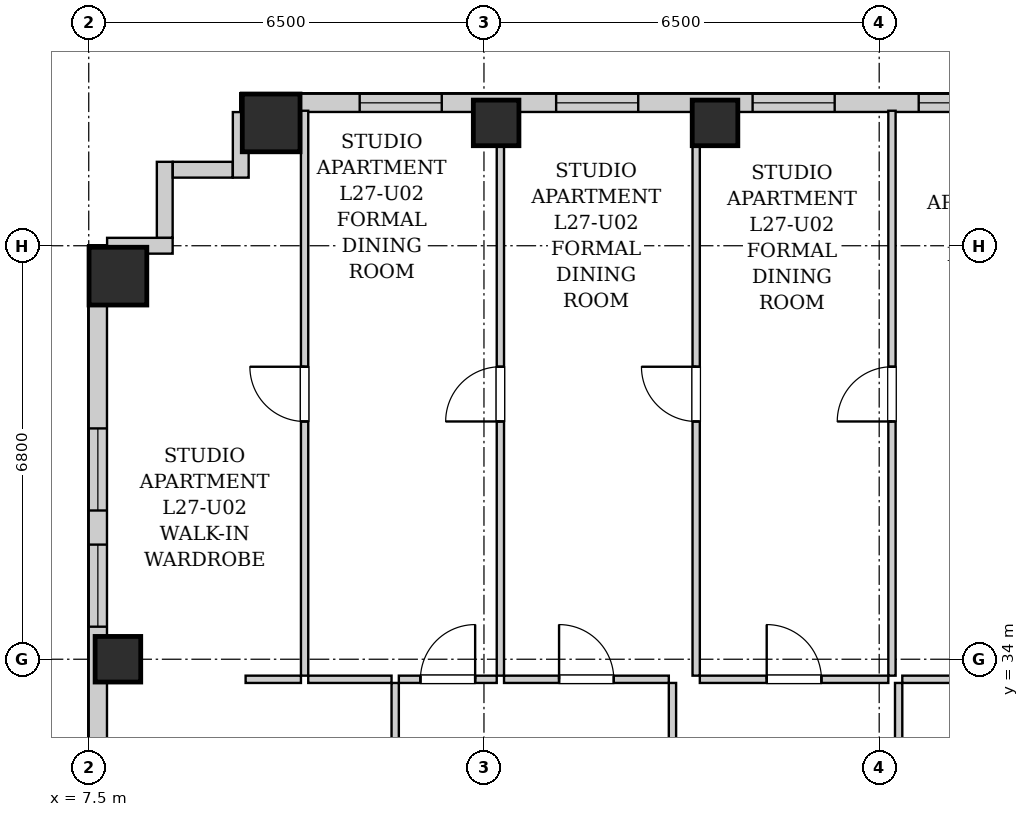
"""IFC4 building model, lengths in metres.
Left out: names, types, materials, properties, quantities, classifications, styles, units other than length and angle.
Written with IfcOpenShell. Run it as: python <this file> out.ifc"""

import sys

from ifc_helpers import new_model, si_unit, direction, frame, frame_2d, origin, origin_2d, place, context, subcontext, project, spatial, rectangle, extrude, element, fill, save


model = new_model("IFC4")
c1 = context("Model", 3, precision=1e-05, world=origin(), true_north=direction((0.0, 1.0)))
c2 = subcontext(c1, "Body", "Model", "MODEL_VIEW")
j1 = project(units=[si_unit("LENGTHUNIT", "METRE"), si_unit("PLANEANGLEUNIT", "RADIAN")], contexts=[c1])
p1 = place(None, origin())
s1 = spatial("IfcSite", under=j1, at=p1, CompositionType="ELEMENT")
p2 = place(p1, origin())
s2 = spatial("IfcBuilding", under=s1, at=p2, CompositionType="ELEMENT")
p3 = place(p2, frame((0.0, 0.0, 97.5)))
s3 = spatial("IfcBuildingStorey", under=s2, at=p3, CompositionType="ELEMENT", Elevation=97.5)
p4 = place(p3, frame((10.5, 42.82, 0.0), z_axis=(0.0, 0.0, 1.0), x_axis=(1.0, 0.0, 0.0)))
e1 = element("IfcColumn", 1, at=p4, inside=s3, PredefinedType="COLUMN", context=c2, shape_type="SweptSolid", body=[
    extrude(rectangle(XDim=0.95, YDim=0.95, at=origin_2d()), origin(), (0.0, 0.0, 1.0), 3.2),
])
for number, where, z_axis, x_axis in (
    (2, (14.2, 42.82, 0.0), (0.0, 0.0, 1.0), (1.0, 0.0, 0.0)),
    (3, (17.8, 42.82, 0.0), (0.0, 0.0, 1.0), (1.0, 0.0, 0.0)),
    (4, (7.98, 34.0, 0.0), (0.0, 0.0, 1.0), (1.0, 0.0, 0.0)),
):
    element("IfcColumn", number, at=place(p3, frame(where, z_axis=z_axis, x_axis=x_axis)), inside=s3, PredefinedType="COLUMN", context=c2, shape_type="SweptSolid", body=[
        extrude(rectangle(XDim=0.75, YDim=0.75, at=origin_2d()), origin(), (0.0, 0.0, 1.0), 3.2),
    ])
p5 = place(p3, frame((7.98, 40.3, 0.0), z_axis=(0.0, 0.0, 1.0), x_axis=(1.0, 0.0, 0.0)))
e5 = element("IfcColumn", 5, at=p5, inside=s3, PredefinedType="COLUMN", context=c2, shape_type="SweptSolid", body=[
    extrude(rectangle(XDim=0.95, YDim=0.95, at=origin_2d()), origin(), (0.0, 0.0, 1.0), 3.2),
])
p6 = place(p3, frame((10.0, 43.15, 0.0), z_axis=(0.0, 0.0, 1.0), x_axis=(1.0, 0.0, 0.0)))
e6 = element("IfcWall", 6, at=p6, inside=s3, PredefinedType="SOLIDWALL", context=c2, shape_type="SweptSolid", body=[
    extrude(rectangle(XDim=24.35, YDim=0.3, at=frame_2d((12.175, 0.0))), origin(), (0.0, 0.0, 1.0), 2.94),
])
p7 = place(p6, frame((1.956, 0.0, 0.55)))
e7 = element("IfcOpeningElement", 7, at=p7, cuts=e6, PredefinedType="OPENING", context=c2, shape_type="SweptSolid", body=[
    extrude(rectangle(XDim=1.35, YDim=1.2, at=frame_2d((0.675, 0.6))), frame((0.0, 0.16, 0.0), z_axis=(0.0, -1.0, 0.0), x_axis=(1.0, 0.0, 0.0)), (0.0, 0.0, 1.0), 0.32),
])
p8 = place(p6, frame((5.187, 0.0, 0.55)))
e8 = element("IfcOpeningElement", 8, at=p8, cuts=e6, PredefinedType="OPENING", context=c2, shape_type="SweptSolid", body=[
    extrude(rectangle(XDim=1.35, YDim=1.2, at=frame_2d((0.675, 0.6))), frame((0.0, 0.16, 0.0), z_axis=(0.0, -1.0, 0.0), x_axis=(1.0, 0.0, 0.0)), (0.0, 0.0, 1.0), 0.32),
])
p9 = place(p6, frame((8.418, 0.0, 0.55)))
e9 = element("IfcOpeningElement", 9, at=p9, cuts=e6, PredefinedType="OPENING", context=c2, shape_type="SweptSolid", body=[
    extrude(rectangle(XDim=1.35, YDim=1.2, at=frame_2d((0.675, 0.6))), frame((0.0, 0.16, 0.0), z_axis=(0.0, -1.0, 0.0), x_axis=(1.0, 0.0, 0.0)), (0.0, 0.0, 1.0), 0.32),
])
p10 = place(p6, frame((11.15, 0.0, 0.55)))
e10 = element("IfcOpeningElement", 10, at=p10, cuts=e6, PredefinedType="OPENING", context=c2, shape_type="SweptSolid", body=[
    extrude(rectangle(XDim=1.35, YDim=1.2, at=frame_2d((0.675, 0.6))), frame((0.0, 0.16, 0.0), z_axis=(0.0, -1.0, 0.0), x_axis=(1.0, 0.0, 0.0)), (0.0, 0.0, 1.0), 0.32),
])
p11 = place(p6, frame((18.038, 0.0, 0.55)))
e11 = element("IfcOpeningElement", 11, at=p11, cuts=e6, PredefinedType="OPENING", context=c2, shape_type="SweptSolid", body=[
    extrude(rectangle(XDim=1.35, YDim=1.2, at=frame_2d((0.675, 0.6))), frame((0.0, 0.16, 0.0), z_axis=(0.0, -1.0, 0.0), x_axis=(1.0, 0.0, 0.0)), (0.0, 0.0, 1.0), 0.32),
])
p12 = place(p6, frame((21.315, 0.0, 0.55)))
e12 = element("IfcOpeningElement", 12, at=p12, cuts=e6, PredefinedType="OPENING", context=c2, shape_type="SweptSolid", body=[
    extrude(rectangle(XDim=1.35, YDim=1.2, at=frame_2d((0.675, 0.6))), frame((0.0, 0.16, 0.0), z_axis=(0.0, -1.0, 0.0), x_axis=(1.0, 0.0, 0.0)), (0.0, 0.0, 1.0), 0.32),
])
p13 = place(p3, frame((7.65, 2.5, 0.0), z_axis=(0.0, 0.0, 1.0), x_axis=(0.0, 1.0, 0.0)))
e13 = element("IfcWall", 13, at=p13, inside=s3, PredefinedType="SOLIDWALL", context=c2, shape_type="SweptSolid", body=[
    extrude(rectangle(XDim=38.3, YDim=0.3, at=frame_2d((19.15, 0.0))), origin(), (0.0, 0.0, 1.0), 2.94),
])
p14 = place(p13, frame((3.38, 0.0, 0.55)))
e14 = element("IfcOpeningElement", 14, at=p14, cuts=e13, PredefinedType="OPENING", context=c2, shape_type="SweptSolid", body=[
    extrude(rectangle(XDim=1.35, YDim=1.2, at=frame_2d((0.675, 0.6))), frame((0.0, 0.16, 0.0), z_axis=(0.0, -1.0, 0.0), x_axis=(1.0, 0.0, 0.0)), (0.0, 0.0, 1.0), 0.32),
])
p15 = place(p13, frame((1.135, 0.0, 0.55)))
e15 = element("IfcOpeningElement", 15, at=p15, cuts=e13, PredefinedType="OPENING", context=c2, shape_type="SweptSolid", body=[
    extrude(rectangle(XDim=1.35, YDim=1.2, at=frame_2d((0.675, 0.6))), frame((0.0, 0.16, 0.0), z_axis=(0.0, -1.0, 0.0), x_axis=(1.0, 0.0, 0.0)), (0.0, 0.0, 1.0), 0.32),
])
p16 = place(p13, frame((33.946, 0.0, 0.55)))
e16 = element("IfcOpeningElement", 16, at=p16, cuts=e13, PredefinedType="OPENING", context=c2, shape_type="SweptSolid", body=[
    extrude(rectangle(XDim=1.35, YDim=1.2, at=frame_2d((0.675, 0.6))), frame((0.0, 0.16, 0.0), z_axis=(0.0, -1.0, 0.0), x_axis=(1.0, 0.0, 0.0)), (0.0, 0.0, 1.0), 0.32),
])
p17 = place(p13, frame((32.035, 0.0, 0.55)))
e17 = element("IfcOpeningElement", 17, at=p17, cuts=e13, PredefinedType="OPENING", context=c2, shape_type="SweptSolid", body=[
    extrude(rectangle(XDim=1.35, YDim=1.2, at=frame_2d((0.675, 0.6))), frame((0.0, 0.16, 0.0), z_axis=(0.0, -1.0, 0.0), x_axis=(1.0, 0.0, 0.0)), (0.0, 0.0, 1.0), 0.32),
])
p18 = place(p13, frame((15.65, 0.0, 0.55)))
e18 = element("IfcOpeningElement", 18, at=p18, cuts=e13, PredefinedType="OPENING", context=c2, shape_type="SweptSolid", body=[
    extrude(rectangle(XDim=1.35, YDim=1.2, at=frame_2d((0.675, 0.6))), frame((0.0, 0.16, 0.0), z_axis=(0.0, -1.0, 0.0), x_axis=(1.0, 0.0, 0.0)), (0.0, 0.0, 1.0), 0.32),
])
p19 = place(p13, frame((13.035, 0.0, 0.55)))
e19 = element("IfcOpeningElement", 19, at=p19, cuts=e13, PredefinedType="OPENING", context=c2, shape_type="SweptSolid", body=[
    extrude(rectangle(XDim=1.35, YDim=1.2, at=frame_2d((0.675, 0.6))), frame((0.0, 0.16, 0.0), z_axis=(0.0, -1.0, 0.0), x_axis=(1.0, 0.0, 0.0)), (0.0, 0.0, 1.0), 0.32),
])
p20 = place(p13, frame((22.831, 0.0, 0.55)))
e20 = element("IfcOpeningElement", 20, at=p20, cuts=e13, PredefinedType="OPENING", context=c2, shape_type="SweptSolid", body=[
    extrude(rectangle(XDim=1.35, YDim=1.2, at=frame_2d((0.675, 0.6))), frame((0.0, 0.16, 0.0), z_axis=(0.0, -1.0, 0.0), x_axis=(1.0, 0.0, 0.0)), (0.0, 0.0, 1.0), 0.32),
])
p21 = place(p13, frame((24.441, 0.0, 0.55)))
e21 = element("IfcOpeningElement", 21, at=p21, cuts=e13, PredefinedType="OPENING", context=c2, shape_type="SweptSolid", body=[
    extrude(rectangle(XDim=1.35, YDim=1.2, at=frame_2d((0.675, 0.6))), frame((0.0, 0.16, 0.0), z_axis=(0.0, -1.0, 0.0), x_axis=(1.0, 0.0, 0.0)), (0.0, 0.0, 1.0), 0.32),
])
p22 = place(p3, frame((7.802, 40.8, 0.0), z_axis=(0.0, 0.0, 1.0), x_axis=(1.0, 0.0, 0.0)))
e22 = element("IfcWall", 22, at=p22, inside=s3, PredefinedType="SOLIDWALL", context=c2, shape_type="SweptSolid", body=[
    extrude(rectangle(XDim=1.078, YDim=0.26, at=frame_2d((0.539, 0.0))), origin(), (0.0, 0.0, 1.0), 2.94),
])
p23 = place(p3, frame((8.75, 40.932, 0.0), z_axis=(0.0, 0.0, 1.0), x_axis=(0.0, 1.0, 0.0)))
e23 = element("IfcWall", 23, at=p23, inside=s3, PredefinedType="SOLIDWALL", context=c2, shape_type="SweptSolid", body=[
    extrude(rectangle(XDim=1.248, YDim=0.26, at=frame_2d((0.624, 0.0))), origin(), (0.0, 0.0, 1.0), 2.94),
])
p24 = place(p3, frame((8.882, 42.05, 0.0), z_axis=(0.0, 0.0, 1.0), x_axis=(1.0, 0.0, 0.0)))
e24 = element("IfcWall", 24, at=p24, inside=s3, PredefinedType="SOLIDWALL", context=c2, shape_type="SweptSolid", body=[
    extrude(rectangle(XDim=0.986, YDim=0.26, at=frame_2d((0.493, 0.0))), origin(), (0.0, 0.0, 1.0), 2.94),
])
p25 = place(p3, frame((10.0, 41.92, 0.0), z_axis=(0.0, 0.0, 1.0), x_axis=(0.0, 1.0, 0.0)))
e25 = element("IfcWall", 25, at=p25, inside=s3, PredefinedType="SOLIDWALL", context=c2, shape_type="SweptSolid", body=[
    extrude(rectangle(XDim=1.078, YDim=0.26, at=frame_2d((0.539, 0.0))), origin(), (0.0, 0.0, 1.0), 2.94),
])
p26 = place(p3, frame((12.54, 30.76, 0.0), z_axis=(0.0, 0.0, 1.0), x_axis=(0.0, 1.0, 0.0)))
e26 = element("IfcWall", 26, at=p26, inside=s3, PredefinedType="PARTITIONING", context=c2, shape_type="SweptSolid", body=[
    extrude(rectangle(XDim=2.85, YDim=0.12, at=frame_2d((1.425, 0.0))), origin(), (0.0, 0.0, 1.0), 2.94),
])
p27 = place(p26, frame((0.995, 0.0, 0.0)))
e27 = element("IfcOpeningElement", 27, at=p27, cuts=e26, PredefinedType="OPENING", context=c2, shape_type="SweptSolid", body=[
    extrude(rectangle(XDim=0.86, YDim=2.05, at=frame_2d((0.43, 1.025))), frame((0.0, 0.07, 0.0), z_axis=(0.0, -1.0, 0.0), x_axis=(1.0, 0.0, 0.0)), (0.0, 0.0, 1.0), 0.14),
])
p28 = place(p3, frame((10.08, 33.67, 0.0), z_axis=(0.0, 0.0, 1.0), x_axis=(1.0, 0.0, 0.0)))
e28 = element("IfcWall", 28, at=p28, inside=s3, PredefinedType="PARTITIONING", context=c2, shape_type="SweptSolid", body=[
    extrude(rectangle(XDim=0.91, YDim=0.12, at=frame_2d((0.455, 0.0))), origin(), (0.0, 0.0, 1.0), 2.94),
])
p29 = place(p3, frame((11.11, 33.67, 0.0), z_axis=(0.0, 0.0, 1.0), x_axis=(1.0, 0.0, 0.0)))
e29 = element("IfcWall", 29, at=p29, inside=s3, PredefinedType="PARTITIONING", context=c2, shape_type="SweptSolid", body=[
    extrude(rectangle(XDim=1.37, YDim=0.12, at=frame_2d((0.685, 0.0))), origin(), (0.0, 0.0, 1.0), 2.94),
])
p30 = place(p3, frame((17.1, 30.76, 0.0), z_axis=(0.0, 0.0, 1.0), x_axis=(0.0, 1.0, 0.0)))
e30 = element("IfcWall", 30, at=p30, inside=s3, PredefinedType="PARTITIONING", context=c2, shape_type="SweptSolid", body=[
    extrude(rectangle(XDim=2.85, YDim=0.12, at=frame_2d((1.425, 0.0))), origin(), (0.0, 0.0, 1.0), 2.94),
])
p31 = place(p30, frame((0.975, 0.0, 0.0)))
e31 = element("IfcOpeningElement", 31, at=p31, cuts=e30, PredefinedType="OPENING", context=c2, shape_type="SweptSolid", body=[
    extrude(rectangle(XDim=0.9, YDim=2.05, at=frame_2d((0.45, 1.025))), frame((0.0, 0.07, 0.0), z_axis=(0.0, -1.0, 0.0), x_axis=(1.0, 0.0, 0.0)), (0.0, 0.0, 1.0), 0.14),
])
p32 = place(p3, frame((12.6, 33.67, 0.0), z_axis=(0.0, 0.0, 1.0), x_axis=(1.0, 0.0, 0.0)))
e32 = element("IfcWall", 32, at=p32, inside=s3, PredefinedType="PARTITIONING", context=c2, shape_type="SweptSolid", body=[
    extrude(rectangle(XDim=1.61, YDim=0.12, at=frame_2d((0.805, 0.0))), origin(), (0.0, 0.0, 1.0), 2.94),
])
p33 = place(p32, frame((0.355, 0.0, 0.0)))
e33 = element("IfcOpeningElement", 33, at=p33, cuts=e32, PredefinedType="OPENING", context=c2, shape_type="SweptSolid", body=[
    extrude(rectangle(XDim=0.9, YDim=2.05, at=frame_2d((0.45, 1.025))), frame((0.0, 0.07, 0.0), z_axis=(0.0, -1.0, 0.0), x_axis=(1.0, 0.0, 0.0)), (0.0, 0.0, 1.0), 0.14),
])
p34 = place(p3, frame((14.33, 33.67, 0.0), z_axis=(0.0, 0.0, 1.0), x_axis=(1.0, 0.0, 0.0)))
e34 = element("IfcWall", 34, at=p34, inside=s3, PredefinedType="PARTITIONING", context=c2, shape_type="SweptSolid", body=[
    extrude(rectangle(XDim=2.71, YDim=0.12, at=frame_2d((1.355, 0.0))), origin(), (0.0, 0.0, 1.0), 2.94),
])
p35 = place(p34, frame((0.905, 0.0, 0.0)))
e35 = element("IfcOpeningElement", 35, at=p35, cuts=e34, PredefinedType="OPENING", context=c2, shape_type="SweptSolid", body=[
    extrude(rectangle(XDim=0.9, YDim=2.05, at=frame_2d((0.45, 1.025))), frame((0.0, 0.07, 0.0), z_axis=(0.0, -1.0, 0.0), x_axis=(1.0, 0.0, 0.0)), (0.0, 0.0, 1.0), 0.14),
])
p36 = place(p3, frame((20.82, 30.76, 0.0), z_axis=(0.0, 0.0, 1.0), x_axis=(0.0, 1.0, 0.0)))
e36 = element("IfcWall", 36, at=p36, inside=s3, PredefinedType="PARTITIONING", context=c2, shape_type="SweptSolid", body=[
    extrude(rectangle(XDim=2.85, YDim=0.12, at=frame_2d((1.425, 0.0))), origin(), (0.0, 0.0, 1.0), 2.94),
])
p37 = place(p36, frame((0.975, 0.0, 0.0)))
e37 = element("IfcOpeningElement", 37, at=p37, cuts=e36, PredefinedType="OPENING", context=c2, shape_type="SweptSolid", body=[
    extrude(rectangle(XDim=0.9, YDim=2.05, at=frame_2d((0.45, 1.025))), frame((0.0, 0.07, 0.0), z_axis=(0.0, -1.0, 0.0), x_axis=(1.0, 0.0, 0.0)), (0.0, 0.0, 1.0), 0.14),
])
p38 = place(p3, frame((17.55, 33.67, 0.0), z_axis=(0.0, 0.0, 1.0), x_axis=(1.0, 0.0, 0.0)))
e38 = element("IfcWall", 38, at=p38, inside=s3, PredefinedType="PARTITIONING", context=c2, shape_type="SweptSolid", body=[
    extrude(rectangle(XDim=3.1, YDim=0.12, at=frame_2d((1.55, 0.0))), origin(), (0.0, 0.0, 1.0), 2.94),
])
p39 = place(p38, frame((1.1, 0.0, 0.0)))
e39 = element("IfcOpeningElement", 39, at=p39, cuts=e38, PredefinedType="OPENING", context=c2, shape_type="SweptSolid", body=[
    extrude(rectangle(XDim=0.9, YDim=2.05, at=frame_2d((0.45, 1.025))), frame((0.0, 0.07, 0.0), z_axis=(0.0, -1.0, 0.0), x_axis=(1.0, 0.0, 0.0)), (0.0, 0.0, 1.0), 0.14),
])
p40 = place(p3, frame((20.88, 33.67, 0.0), z_axis=(0.0, 0.0, 1.0), x_axis=(1.0, 0.0, 0.0)))
e40 = element("IfcWall", 40, at=p40, inside=s3, PredefinedType="PARTITIONING", context=c2, shape_type="SweptSolid", body=[
    extrude(rectangle(XDim=2.99, YDim=0.12, at=frame_2d((1.495, 0.0))), origin(), (0.0, 0.0, 1.0), 2.94),
])
p41 = place(p40, frame((1.045, 0.0, 0.0)))
e41 = element("IfcOpeningElement", 41, at=p41, cuts=e40, PredefinedType="OPENING", context=c2, shape_type="SweptSolid", body=[
    extrude(rectangle(XDim=0.9, YDim=2.05, at=frame_2d((0.45, 1.025))), frame((0.0, 0.07, 0.0), z_axis=(0.0, -1.0, 0.0), x_axis=(1.0, 0.0, 0.0)), (0.0, 0.0, 1.0), 0.14),
])
p42 = place(p3, frame((11.05, 33.73, 0.0), z_axis=(0.0, 0.0, 1.0), x_axis=(0.0, 1.0, 0.0)))
e42 = element("IfcWall", 42, at=p42, inside=s3, PredefinedType="PARTITIONING", context=c2, shape_type="SweptSolid", body=[
    extrude(rectangle(XDim=9.29, YDim=0.12, at=frame_2d((4.645, 0.0))), origin(), (0.0, 0.0, 1.0), 2.94),
])
p43 = place(p42, frame((4.18, 0.0, 0.0)))
e43 = element("IfcOpeningElement", 43, at=p43, cuts=e42, PredefinedType="OPENING", context=c2, shape_type="SweptSolid", body=[
    extrude(rectangle(XDim=0.9, YDim=2.05, at=frame_2d((0.45, 1.025))), frame((0.0, 0.07, 0.0), z_axis=(0.0, -1.0, 0.0), x_axis=(1.0, 0.0, 0.0)), (0.0, 0.0, 1.0), 0.14),
])
p44 = place(p3, frame((14.27, 33.73, 0.0), z_axis=(0.0, 0.0, 1.0), x_axis=(0.0, 1.0, 0.0)))
e44 = element("IfcWall", 44, at=p44, inside=s3, PredefinedType="PARTITIONING", context=c2, shape_type="SweptSolid", body=[
    extrude(rectangle(XDim=9.29, YDim=0.12, at=frame_2d((4.645, 0.0))), origin(), (0.0, 0.0, 1.0), 2.94),
])
p45 = place(p44, frame((4.18, 0.0, 0.0)))
e45 = element("IfcOpeningElement", 45, at=p45, cuts=e44, PredefinedType="OPENING", context=c2, shape_type="SweptSolid", body=[
    extrude(rectangle(XDim=0.9, YDim=2.05, at=frame_2d((0.45, 1.025))), frame((0.0, 0.07, 0.0), z_axis=(0.0, -1.0, 0.0), x_axis=(1.0, 0.0, 0.0)), (0.0, 0.0, 1.0), 0.14),
])
p46 = place(p3, frame((17.49, 33.73, 0.0), z_axis=(0.0, 0.0, 1.0), x_axis=(0.0, 1.0, 0.0)))
e46 = element("IfcWall", 46, at=p46, inside=s3, PredefinedType="PARTITIONING", context=c2, shape_type="SweptSolid", body=[
    extrude(rectangle(XDim=9.29, YDim=0.12, at=frame_2d((4.645, 0.0))), origin(), (0.0, 0.0, 1.0), 2.94),
])
p47 = place(p46, frame((4.18, 0.0, 0.0)))
e47 = element("IfcOpeningElement", 47, at=p47, cuts=e46, PredefinedType="OPENING", context=c2, shape_type="SweptSolid", body=[
    extrude(rectangle(XDim=0.9, YDim=2.05, at=frame_2d((0.45, 1.025))), frame((0.0, 0.07, 0.0), z_axis=(0.0, -1.0, 0.0), x_axis=(1.0, 0.0, 0.0)), (0.0, 0.0, 1.0), 0.14),
])
p48 = place(p3, frame((20.71, 33.73, 0.0), z_axis=(0.0, 0.0, 1.0), x_axis=(0.0, 1.0, 0.0)))
e48 = element("IfcWall", 48, at=p48, inside=s3, PredefinedType="PARTITIONING", context=c2, shape_type="SweptSolid", body=[
    extrude(rectangle(XDim=9.29, YDim=0.12, at=frame_2d((4.645, 0.0))), origin(), (0.0, 0.0, 1.0), 2.94),
])
p49 = place(p48, frame((4.18, 0.0, 0.0)))
e49 = element("IfcOpeningElement", 49, at=p49, cuts=e48, PredefinedType="OPENING", context=c2, shape_type="SweptSolid", body=[
    extrude(rectangle(XDim=0.9, YDim=2.05, at=frame_2d((0.45, 1.025))), frame((0.0, 0.07, 0.0), z_axis=(0.0, -1.0, 0.0), x_axis=(1.0, 0.0, 0.0)), (0.0, 0.0, 1.0), 0.14),
])
p50 = place(p33, origin())
e50 = element("IfcDoor", 50, at=p50, inside=s3, OperationType="SINGLE_SWING_RIGHT", PredefinedType="DOOR", context=c2, shape_type="SweptSolid", body=[
    extrude(rectangle(XDim=0.9, YDim=2.05, at=frame_2d((0.45, 1.025))), frame((0.0, 0.025, 0.0), z_axis=(0.0, -1.0, 0.0), x_axis=(1.0, 0.0, 0.0)), (0.0, 0.0, 1.0), 0.05),
])
fill(e33, e50)
p51 = place(p35, origin())
e51 = element("IfcDoor", 51, at=p51, inside=s3, OperationType="SINGLE_SWING_LEFT", PredefinedType="DOOR", context=c2, shape_type="SweptSolid", body=[
    extrude(rectangle(XDim=0.9, YDim=2.05, at=frame_2d((0.45, 1.025))), frame((0.0, 0.025, 0.0), z_axis=(0.0, -1.0, 0.0), x_axis=(1.0, 0.0, 0.0)), (0.0, 0.0, 1.0), 0.05),
])
fill(e35, e51)
p52 = place(p39, origin())
e52 = element("IfcDoor", 52, at=p52, inside=s3, OperationType="SINGLE_SWING_LEFT", PredefinedType="DOOR", context=c2, shape_type="SweptSolid", body=[
    extrude(rectangle(XDim=0.9, YDim=2.05, at=frame_2d((0.45, 1.025))), frame((0.0, 0.025, 0.0), z_axis=(0.0, -1.0, 0.0), x_axis=(1.0, 0.0, 0.0)), (0.0, 0.0, 1.0), 0.05),
])
fill(e39, e52)
p53 = place(p43, origin())
e53 = element("IfcDoor", 53, at=p53, inside=s3, OperationType="SINGLE_SWING_RIGHT", PredefinedType="DOOR", context=c2, shape_type="SweptSolid", body=[
    extrude(rectangle(XDim=0.9, YDim=2.05, at=frame_2d((0.45, 1.025))), frame((0.0, 0.025, 0.0), z_axis=(0.0, -1.0, 0.0), x_axis=(1.0, 0.0, 0.0)), (0.0, 0.0, 1.0), 0.05),
])
fill(e43, e53)
p54 = place(p45, origin())
e54 = element("IfcDoor", 54, at=p54, inside=s3, OperationType="SINGLE_SWING_LEFT", PredefinedType="DOOR", context=c2, shape_type="SweptSolid", body=[
    extrude(rectangle(XDim=0.9, YDim=2.05, at=frame_2d((0.45, 1.025))), frame((0.0, 0.025, 0.0), z_axis=(0.0, -1.0, 0.0), x_axis=(1.0, 0.0, 0.0)), (0.0, 0.0, 1.0), 0.05),
])
fill(e45, e54)
p55 = place(p47, origin())
e55 = element("IfcDoor", 55, at=p55, inside=s3, OperationType="SINGLE_SWING_RIGHT", PredefinedType="DOOR", context=c2, shape_type="SweptSolid", body=[
    extrude(rectangle(XDim=0.9, YDim=2.05, at=frame_2d((0.45, 1.025))), frame((0.0, 0.025, 0.0), z_axis=(0.0, -1.0, 0.0), x_axis=(1.0, 0.0, 0.0)), (0.0, 0.0, 1.0), 0.05),
])
fill(e47, e55)
p56 = place(p49, origin())
e56 = element("IfcDoor", 56, at=p56, inside=s3, OperationType="SINGLE_SWING_LEFT", PredefinedType="DOOR", context=c2, shape_type="SweptSolid", body=[
    extrude(rectangle(XDim=0.9, YDim=2.05, at=frame_2d((0.45, 1.025))), frame((0.0, 0.025, 0.0), z_axis=(0.0, -1.0, 0.0), x_axis=(1.0, 0.0, 0.0)), (0.0, 0.0, 1.0), 0.05),
])
fill(e49, e56)
p57 = place(p16, origin())
e57 = element("IfcWindow", 57, at=p57, inside=s3, PartitioningType="SINGLE_PANEL", PredefinedType="WINDOW", context=c2, shape_type="SweptSolid", body=[
    extrude(rectangle(XDim=1.35, YDim=1.2, at=frame_2d((0.675, 0.6))), frame((0.0, 0.03, 0.0), z_axis=(0.0, -1.0, 0.0), x_axis=(1.0, 0.0, 0.0)), (0.0, 0.0, 1.0), 0.06),
])
fill(e16, e57)
p58 = place(p17, origin())
e58 = element("IfcWindow", 58, at=p58, inside=s3, PartitioningType="SINGLE_PANEL", PredefinedType="WINDOW", context=c2, shape_type="SweptSolid", body=[
    extrude(rectangle(XDim=1.35, YDim=1.2, at=frame_2d((0.675, 0.6))), frame((0.0, 0.03, 0.0), z_axis=(0.0, -1.0, 0.0), x_axis=(1.0, 0.0, 0.0)), (0.0, 0.0, 1.0), 0.06),
])
fill(e17, e58)
p59 = place(p7, origin())
e59 = element("IfcWindow", 59, at=p59, inside=s3, PartitioningType="SINGLE_PANEL", PredefinedType="WINDOW", context=c2, shape_type="SweptSolid", body=[
    extrude(rectangle(XDim=1.35, YDim=1.2, at=frame_2d((0.675, 0.6))), frame((0.0, 0.03, 0.0), z_axis=(0.0, -1.0, 0.0), x_axis=(1.0, 0.0, 0.0)), (0.0, 0.0, 1.0), 0.06),
])
fill(e7, e59)
p60 = place(p8, origin())
e60 = element("IfcWindow", 60, at=p60, inside=s3, PartitioningType="SINGLE_PANEL", PredefinedType="WINDOW", context=c2, shape_type="SweptSolid", body=[
    extrude(rectangle(XDim=1.35, YDim=1.2, at=frame_2d((0.675, 0.6))), frame((0.0, 0.03, 0.0), z_axis=(0.0, -1.0, 0.0), x_axis=(1.0, 0.0, 0.0)), (0.0, 0.0, 1.0), 0.06),
])
fill(e8, e60)
p61 = place(p9, origin())
e61 = element("IfcWindow", 61, at=p61, inside=s3, PartitioningType="SINGLE_PANEL", PredefinedType="WINDOW", context=c2, shape_type="SweptSolid", body=[
    extrude(rectangle(XDim=1.35, YDim=1.2, at=frame_2d((0.675, 0.6))), frame((0.0, 0.03, 0.0), z_axis=(0.0, -1.0, 0.0), x_axis=(1.0, 0.0, 0.0)), (0.0, 0.0, 1.0), 0.06),
])
fill(e9, e61)
p62 = place(p10, origin())
e62 = element("IfcWindow", 62, at=p62, inside=s3, PartitioningType="SINGLE_PANEL", PredefinedType="WINDOW", context=c2, shape_type="SweptSolid", body=[
    extrude(rectangle(XDim=1.35, YDim=1.2, at=frame_2d((0.675, 0.6))), frame((0.0, 0.03, 0.0), z_axis=(0.0, -1.0, 0.0), x_axis=(1.0, 0.0, 0.0)), (0.0, 0.0, 1.0), 0.06),
])
fill(e10, e62)
save(model, sys.argv[1])
